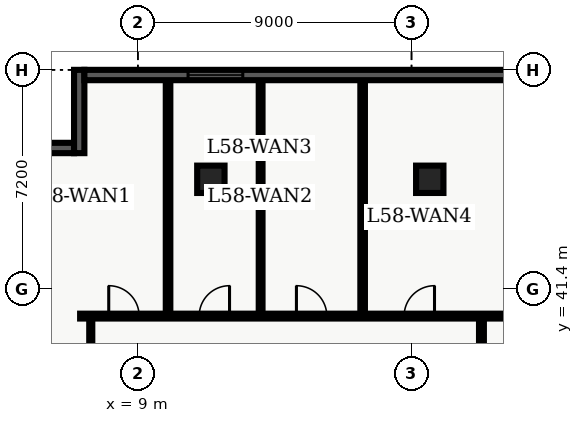
"""IFC4 building model, lengths in metres.
Left out: names, types, materials, properties, quantities, classifications, styles, units other than length and angle.
Written with IfcOpenShell. Run it as: python <this file> out.ifc"""

import sys

from ifc_helpers import new_model, entity, si_unit, converted_unit, direction, frame, origin_with_axes, origin_2d_with_axis, place, context, subcontext, project, spatial, polyline, rectangle, outline, extrude, element, fill, save


model = new_model("IFC4")
c1 = context("Model", 3, precision=1e-05, world=origin_with_axes(), true_north=direction((0.0, 1.0)))
c2 = subcontext(c1, "Body", "Model", "MODEL_VIEW")
j1 = project(units=[si_unit("LENGTHUNIT", "METRE"), converted_unit("PLANEANGLEUNIT", "DEGREE", entity("IfcPlaneAngleMeasure", 0.017), si_unit("PLANEANGLEUNIT", "RADIAN"), dimensions=[0, 0, 0, 0, 0, 0, 0])], contexts=[c1])
p1 = place(None, origin_with_axes())
s1 = spatial("IfcSite", under=j1, at=p1, CompositionType="ELEMENT")
p2 = place(p1, origin_with_axes())
s2 = spatial("IfcBuilding", under=s1, at=p2, CompositionType="ELEMENT")
p3 = place(p2, frame((0.0, 0.0, 236.4), z_axis=(0.0, 0.0, 1.0), x_axis=(1.0, 0.0, 0.0)))
s3 = spatial("IfcBuildingStorey", under=s2, at=p3, CompositionType="ELEMENT", Elevation=236.4)
for number, where, z_axis, x_axis in (
    (1, (11.4, 45.0, 0.0), (0.0, 0.0, 1.0), (1.0, 0.0, 0.0)),
    (2, (18.6, 45.0, 0.0), (0.0, 0.0, 1.0), (1.0, 0.0, 0.0)),
):
    element("IfcColumn", number, at=place(p3, frame(where, z_axis=z_axis, x_axis=x_axis)), inside=s3, PredefinedType="COLUMN", context=c2, shape_type="SweptSolid", body=[
        extrude(rectangle(XDim=0.9, YDim=0.9, at=origin_2d_with_axis()), origin_with_axes(), (0.0, 0.0, 1.0), 3.9),
    ])
p4 = place(p3, frame((7.1, 40.5, 0.0), z_axis=(0.0, 0.0, 1.0), x_axis=(1.0, 0.0, 0.0)))
e3 = element("IfcWall", 3, at=p4, inside=s3, PredefinedType="PARTITIONING", context=c2, shape_type="SweptSolid", body=[
    extrude(outline(polyline([(0.0, -0.08), (24.965, -0.08), (24.965, 0.08), (0.0, 0.08), (0.0, -0.08)])), origin_with_axes(), (0.0, 0.0, 1.0), 2.7),
])
p5 = place(p4, frame((1.441, 0.0, 0.0), z_axis=(0.0, 0.0, 1.0), x_axis=(1.0, 0.0, 0.0)))
e4 = element("IfcOpeningElement", 4, at=p5, cuts=e3, PredefinedType="OPENING", context=c2, shape_type="SweptSolid", body=[
    extrude(rectangle(XDim=1.0, YDim=0.18, at=origin_2d_with_axis()), origin_with_axes(), (0.0, 0.0, 1.0), 2.15),
])
p6 = place(p4, frame((4.415, 0.0, 0.0), z_axis=(0.0, 0.0, 1.0), x_axis=(1.0, 0.0, 0.0)))
e5 = element("IfcOpeningElement", 5, at=p6, cuts=e3, PredefinedType="OPENING", context=c2, shape_type="SweptSolid", body=[
    extrude(rectangle(XDim=1.0, YDim=0.18, at=origin_2d_with_axis()), origin_with_axes(), (0.0, 0.0, 1.0), 2.15),
])
p7 = place(p4, frame((7.614, 0.0, 0.0), z_axis=(0.0, 0.0, 1.0), x_axis=(1.0, 0.0, 0.0)))
e6 = element("IfcOpeningElement", 6, at=p7, cuts=e3, PredefinedType="OPENING", context=c2, shape_type="SweptSolid", body=[
    extrude(rectangle(XDim=1.0, YDim=0.18, at=origin_2d_with_axis()), origin_with_axes(), (0.0, 0.0, 1.0), 2.15),
])
p8 = place(p4, frame((11.156, 0.0, 0.0), z_axis=(0.0, 0.0, 1.0), x_axis=(1.0, 0.0, 0.0)))
e7 = element("IfcOpeningElement", 7, at=p8, cuts=e3, PredefinedType="OPENING", context=c2, shape_type="SweptSolid", body=[
    extrude(rectangle(XDim=1.0, YDim=0.18, at=origin_2d_with_axis()), origin_with_axes(), (0.0, 0.0, 1.0), 2.15),
])
p9 = place(p3, frame((20.3, 7.8, 0.0), z_axis=(0.0, 0.0, 1.0), x_axis=(0.0, 1.0, 0.0)))
e8 = element("IfcWall", 8, at=p9, inside=s3, PredefinedType="PARTITIONING", context=c2, shape_type="SweptSolid", body=[
    extrude(outline(polyline([(0.0, -0.08), (32.7, -0.08), (32.7, 0.08), (0.0, 0.08), (0.0, -0.08)])), origin_with_axes(), (0.0, 0.0, 1.0), 2.7),
])
p10 = place(p9, frame((14.556, 0.0, 0.0), z_axis=(0.0, 0.0, 1.0), x_axis=(1.0, 0.0, 0.0)))
e9 = element("IfcOpeningElement", 9, at=p10, cuts=e8, PredefinedType="OPENING", context=c2, shape_type="SweptSolid", body=[
    extrude(rectangle(XDim=0.9, YDim=0.18, at=origin_2d_with_axis()), origin_with_axes(), (0.0, 0.0, 1.0), 2.15),
])
p11 = place(p9, frame((18.551, 0.0, 0.0), z_axis=(0.0, 0.0, 1.0), x_axis=(1.0, 0.0, 0.0)))
e10 = element("IfcOpeningElement", 10, at=p11, cuts=e8, PredefinedType="OPENING", context=c2, shape_type="SweptSolid", body=[
    extrude(rectangle(XDim=1.0, YDim=0.18, at=origin_2d_with_axis()), origin_with_axes(), (0.0, 0.0, 1.0), 2.15),
])
p12 = place(p9, frame((22.226, 0.0, 0.0), z_axis=(0.0, 0.0, 1.0), x_axis=(1.0, 0.0, 0.0)))
e11 = element("IfcOpeningElement", 11, at=p12, cuts=e8, PredefinedType="OPENING", context=c2, shape_type="SweptSolid", body=[
    extrude(rectangle(XDim=1.0, YDim=0.18, at=origin_2d_with_axis()), origin_with_axes(), (0.0, 0.0, 1.0), 2.15),
])
p13 = place(p9, frame((25.754, 0.0, 0.0), z_axis=(0.0, 0.0, 1.0), x_axis=(1.0, 0.0, 0.0)))
e12 = element("IfcOpeningElement", 12, at=p13, cuts=e8, PredefinedType="OPENING", context=c2, shape_type="SweptSolid", body=[
    extrude(rectangle(XDim=1.0, YDim=0.18, at=origin_2d_with_axis()), origin_with_axes(), (0.0, 0.0, 1.0), 2.15),
])
p14 = place(p9, frame((5.775, 0.0, 0.0), z_axis=(0.0, 0.0, 1.0), x_axis=(1.0, 0.0, 0.0)))
e13 = element("IfcOpeningElement", 13, at=p14, cuts=e8, PredefinedType="OPENING", context=c2, shape_type="SweptSolid", body=[
    extrude(rectangle(XDim=1.05, YDim=0.18, at=origin_2d_with_axis()), origin_with_axes(), (0.0, 0.0, 1.0), 2.15),
])
p15 = place(p3, frame((7.45, 7.8, 0.0), z_axis=(0.0, 0.0, 1.0), x_axis=(0.0, 1.0, 0.0)))
e14 = element("IfcWall", 14, at=p15, inside=s3, PredefinedType="PARTITIONING", context=c2, shape_type="SweptSolid", body=[
    extrude(outline(polyline([(0.0, -0.05), (32.7, -0.05), (32.7, 0.05), (0.0, 0.05), (0.0, -0.05)])), origin_with_axes(), (0.0, 0.0, 1.0), 2.7),
])
p16 = place(p15, frame((2.296, 0.0, 0.0), z_axis=(0.0, 0.0, 1.0), x_axis=(1.0, 0.0, 0.0)))
e15 = element("IfcOpeningElement", 15, at=p16, cuts=e14, PredefinedType="OPENING", context=c2, shape_type="SweptSolid", body=[
    extrude(rectangle(XDim=1.0, YDim=0.12, at=origin_2d_with_axis()), origin_with_axes(), (0.0, 0.0, 1.0), 2.15),
])
p17 = place(p15, frame((6.989, 0.0, 0.0), z_axis=(0.0, 0.0, 1.0), x_axis=(1.0, 0.0, 0.0)))
e16 = element("IfcOpeningElement", 16, at=p17, cuts=e14, PredefinedType="OPENING", context=c2, shape_type="SweptSolid", body=[
    extrude(rectangle(XDim=1.0, YDim=0.12, at=origin_2d_with_axis()), origin_with_axes(), (0.0, 0.0, 1.0), 2.15),
])
p18 = place(p15, frame((12.56, 0.0, 0.0), z_axis=(0.0, 0.0, 1.0), x_axis=(1.0, 0.0, 0.0)))
e17 = element("IfcOpeningElement", 17, at=p18, cuts=e14, PredefinedType="OPENING", context=c2, shape_type="SweptSolid", body=[
    extrude(rectangle(XDim=1.0, YDim=0.12, at=origin_2d_with_axis()), origin_with_axes(), (0.0, 0.0, 1.0), 2.15),
])
p19 = place(p15, frame((19.334, 0.0, 0.0), z_axis=(0.0, 0.0, 1.0), x_axis=(1.0, 0.0, 0.0)))
e18 = element("IfcOpeningElement", 18, at=p19, cuts=e14, PredefinedType="OPENING", context=c2, shape_type="SweptSolid", body=[
    extrude(rectangle(XDim=1.0, YDim=0.12, at=origin_2d_with_axis()), origin_with_axes(), (0.0, 0.0, 1.0), 2.15),
])
p20 = place(p15, frame((27.817, 0.0, 0.0), z_axis=(0.0, 0.0, 1.0), x_axis=(1.0, 0.0, 0.0)))
e19 = element("IfcOpeningElement", 19, at=p20, cuts=e14, PredefinedType="OPENING", context=c2, shape_type="SweptSolid", body=[
    extrude(rectangle(XDim=1.0, YDim=0.12, at=origin_2d_with_axis()), origin_with_axes(), (0.0, 0.0, 1.0), 2.15),
])
p21 = place(p3, frame((9.992, 40.6, 0.0), z_axis=(0.0, 0.0, 1.0), x_axis=(0.0, 1.0, 0.0)))
e20 = element("IfcWall", 20, at=p21, inside=s3, PredefinedType="PARTITIONING", context=c2, shape_type="SweptSolid", body=[
    extrude(outline(polyline([(0.0, -0.075), (7.665, -0.075), (7.665, 0.075), (0.0, 0.075), (0.0, -0.075)])), origin_with_axes(), (0.0, 0.0, 1.0), 2.7),
])
p22 = place(p3, frame((13.037, 40.6, 0.0), z_axis=(0.0, 0.0, 1.0), x_axis=(0.0, 1.0, 0.0)))
e21 = element("IfcWall", 21, at=p22, inside=s3, PredefinedType="PARTITIONING", context=c2, shape_type="SweptSolid", body=[
    extrude(outline(polyline([(0.0, -0.062), (7.665, -0.062), (7.665, 0.062), (0.0, 0.062), (0.0, -0.062)])), origin_with_axes(), (0.0, 0.0, 1.0), 2.7),
])
p23 = place(p3, frame((16.392, 40.6, 0.0), z_axis=(0.0, 0.0, 1.0), x_axis=(0.0, 1.0, 0.0)))
e22 = element("IfcWall", 22, at=p23, inside=s3, PredefinedType="PARTITIONING", context=c2, shape_type="SweptSolid", body=[
    extrude(outline(polyline([(0.0, -0.075), (7.665, -0.075), (7.665, 0.075), (0.0, 0.075), (0.0, -0.075)])), origin_with_axes(), (0.0, 0.0, 1.0), 2.7),
])
p24 = place(p3, frame((4.84, 46.03, 0.0), z_axis=(0.0, 0.0, 1.0), x_axis=(1.0, 0.0, 0.0)))
e23 = element("IfcWall", 23, at=p24, inside=s3, PredefinedType="SOLIDWALL", context=c2, shape_type="SweptSolid", body=[
    extrude(outline(polyline([(0.0, -0.17), (2.06, -0.17), (2.06, 0.17), (0.0, 0.17), (0.0, -0.17)])), origin_with_axes(), (0.0, 0.0, 1.0), 3.66),
])
p25 = place(p3, frame((7.07, 45.86, 0.0), z_axis=(0.0, 0.0, 1.0), x_axis=(0.0, 1.0, 0.0)))
e24 = element("IfcWall", 24, at=p25, inside=s3, PredefinedType="SOLIDWALL", context=c2, shape_type="SweptSolid", body=[
    extrude(outline(polyline([(0.0, -0.17), (2.74, -0.17), (2.74, 0.17), (0.0, 0.17), (0.0, -0.17)])), origin_with_axes(), (0.0, 0.0, 1.0), 3.66),
])
p26 = place(p3, frame((7.24, 48.43, 0.0), z_axis=(0.0, 0.0, 1.0), x_axis=(1.0, 0.0, 0.0)))
e25 = element("IfcWall", 25, at=p26, inside=s3, PredefinedType="SOLIDWALL", context=c2, shape_type="SweptSolid", body=[
    extrude(outline(polyline([(0.0, -0.17), (18.36, -0.17), (18.36, 0.17), (0.0, 0.17), (0.0, -0.17)])), origin_with_axes(), (0.0, 0.0, 1.0), 3.66),
])
p27 = place(p26, frame((4.31, 0.0, 0.45), z_axis=(0.0, 0.0, 1.0), x_axis=(1.0, 0.0, 0.0)))
e26 = element("IfcOpeningElement", 26, at=p27, cuts=e25, PredefinedType="OPENING", context=c2, shape_type="SweptSolid", body=[
    extrude(rectangle(XDim=1.8, YDim=0.36, at=origin_2d_with_axis()), origin_with_axes(), (0.0, 0.0, 1.0), 2.1),
])
p28 = place(p26, frame((14.9, 0.0, 0.45), z_axis=(0.0, 0.0, 1.0), x_axis=(1.0, 0.0, 0.0)))
e27 = element("IfcOpeningElement", 27, at=p28, cuts=e25, PredefinedType="OPENING", context=c2, shape_type="SweptSolid", body=[
    extrude(rectangle(XDim=1.8, YDim=0.36, at=origin_2d_with_axis()), origin_with_axes(), (0.0, 0.0, 1.0), 2.1),
])
p29 = place(p4, frame((1.441, 0.0, 0.0), z_axis=(0.0, 0.0, 1.0), x_axis=(1.0, 0.0, 0.0)))
e28 = element("IfcDoor", 28, at=p29, inside=s3, OperationType="SINGLE_SWING_LEFT", PredefinedType="DOOR", context=c2, shape_type="SweptSolid", body=[
    extrude(rectangle(XDim=1.0, YDim=0.09, at=origin_2d_with_axis()), origin_with_axes(), (0.0, 0.0, 1.0), 2.15),
])
fill(e4, e28)
p30 = place(p4, frame((4.415, 0.0, 0.0), z_axis=(0.0, 0.0, 1.0), x_axis=(1.0, 0.0, 0.0)))
e29 = element("IfcDoor", 29, at=p30, inside=s3, OperationType="SINGLE_SWING_RIGHT", PredefinedType="DOOR", context=c2, shape_type="SweptSolid", body=[
    extrude(rectangle(XDim=1.0, YDim=0.09, at=origin_2d_with_axis()), origin_with_axes(), (0.0, 0.0, 1.0), 2.15),
])
fill(e5, e29)
p31 = place(p4, frame((7.614, 0.0, 0.0), z_axis=(0.0, 0.0, 1.0), x_axis=(1.0, 0.0, 0.0)))
e30 = element("IfcDoor", 30, at=p31, inside=s3, OperationType="SINGLE_SWING_LEFT", PredefinedType="DOOR", context=c2, shape_type="SweptSolid", body=[
    extrude(rectangle(XDim=1.0, YDim=0.09, at=origin_2d_with_axis()), origin_with_axes(), (0.0, 0.0, 1.0), 2.15),
])
fill(e6, e30)
p32 = place(p4, frame((11.156, 0.0, 0.0), z_axis=(0.0, 0.0, 1.0), x_axis=(1.0, 0.0, 0.0)))
e31 = element("IfcDoor", 31, at=p32, inside=s3, OperationType="SINGLE_SWING_RIGHT", PredefinedType="DOOR", context=c2, shape_type="SweptSolid", body=[
    extrude(rectangle(XDim=1.0, YDim=0.09, at=origin_2d_with_axis()), origin_with_axes(), (0.0, 0.0, 1.0), 2.15),
])
fill(e7, e31)
p33 = place(p26, frame((4.31, 0.0, 0.45), z_axis=(0.0, 0.0, 1.0), x_axis=(1.0, 0.0, 0.0)))
e32 = element("IfcWindow", 32, at=p33, inside=s3, PredefinedType="WINDOW", context=c2, shape_type="SweptSolid", body=[
    extrude(rectangle(XDim=1.8, YDim=0.09, at=origin_2d_with_axis()), origin_with_axes(), (0.0, 0.0, 1.0), 2.1),
])
fill(e26, e32)
save(model, sys.argv[1])
